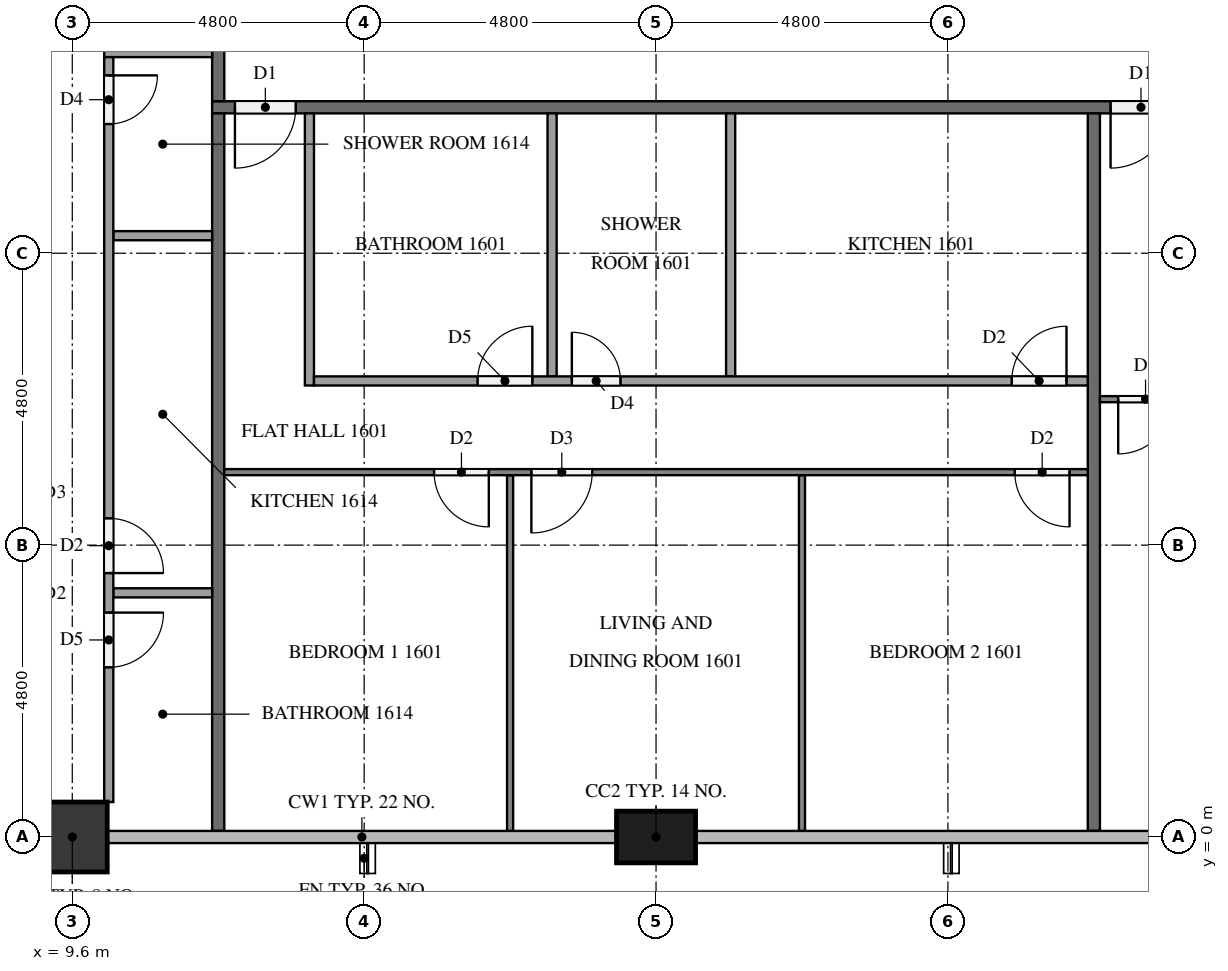
"""IFC4 building model, lengths in metres.
Left out: names, types, materials, properties, quantities, classifications, styles, units other than length and angle.
Written with IfcOpenShell. Run it as: python <this file> out.ifc"""

import sys

from ifc_helpers import new_model, si_unit, direction, frame, frame_2d, origin, origin_2d, place, context, subcontext, project, spatial, rectangle, extrude, element, fill, save


model = new_model("IFC4")
c1 = context("Model", 3, precision=1e-05, world=origin(), true_north=direction((0.0, 1.0)))
c2 = subcontext(c1, "Body", "Model", "MODEL_VIEW")
j1 = project(units=[si_unit("LENGTHUNIT", "METRE"), si_unit("PLANEANGLEUNIT", "RADIAN")], contexts=[c1])
p1 = place(None, origin())
s1 = spatial("IfcSite", under=j1, at=p1, CompositionType="ELEMENT")
p2 = place(p1, origin())
s2 = spatial("IfcBuilding", under=s1, at=p2, CompositionType="ELEMENT")
p3 = place(p2, frame((0.0, 0.0, 66.3)))
s3 = spatial("IfcBuildingStorey", under=s2, at=p3, CompositionType="ELEMENT", Elevation=66.3)
p4 = place(p3, frame((9.6, 0.0, 0.0), z_axis=(0.0, 0.0, 1.0), x_axis=(1.0, 0.0, 0.0)))
e1 = element("IfcColumn", 1, at=p4, inside=s3, PredefinedType="COLUMN", context=c2, shape_type="SweptSolid", body=[
    extrude(rectangle(XDim=1.15, YDim=1.15, at=origin_2d()), origin(), (0.0, 0.0, 1.0), 3.2),
])
p5 = place(p3, frame((19.2, 0.0, 0.0), z_axis=(0.0, 0.0, 1.0), x_axis=(1.0, 0.0, 0.0)))
e2 = element("IfcColumn", 2, at=p5, inside=s3, PredefinedType="COLUMN", context=c2, shape_type="SweptSolid", body=[
    extrude(rectangle(XDim=1.3, YDim=0.85, at=origin_2d()), origin(), (0.0, 0.0, 1.0), 3.2),
])
p6 = place(p3, frame((50.5, 12.0, 0.0), z_axis=(0.0, 0.0, 1.0), x_axis=(-1.0, 0.0, 0.0)))
e3 = element("IfcWall", 3, at=p6, inside=s3, PredefinedType="PARTITIONING", context=c2, shape_type="SweptSolid", body=[
    extrude(rectangle(XDim=38.6, YDim=0.2, at=frame_2d((19.3, 0.0))), origin(), (0.0, 0.0, 1.0), 3.2),
])
p7 = place(p6, frame((37.225, 0.0, 0.0)))
e4 = element("IfcOpeningElement", 4, at=p7, cuts=e3, PredefinedType="OPENING", context=c2, shape_type="SweptSolid", body=[
    extrude(rectangle(XDim=1.0, YDim=2.1, at=frame_2d((0.5, 1.05))), frame((0.0, 0.11, 0.0), z_axis=(0.0, -1.0, 0.0), x_axis=(1.0, 0.0, 0.0)), (0.0, 0.0, 1.0), 0.22),
])
p8 = place(p6, frame((22.825, 0.0, 0.0)))
e5 = element("IfcOpeningElement", 5, at=p8, cuts=e3, PredefinedType="OPENING", context=c2, shape_type="SweptSolid", body=[
    extrude(rectangle(XDim=1.0, YDim=2.1, at=frame_2d((0.5, 1.05))), frame((0.0, 0.11, 0.0), z_axis=(0.0, -1.0, 0.0), x_axis=(1.0, 0.0, 0.0)), (0.0, 0.0, 1.0), 0.22),
])
p9 = place(p6, frame((0.375, 0.0, 0.0)))
e6 = element("IfcOpeningElement", 6, at=p9, cuts=e3, PredefinedType="OPENING", context=c2, shape_type="SweptSolid", body=[
    extrude(rectangle(XDim=1.0, YDim=2.1, at=frame_2d((0.5, 1.05))), frame((0.0, 0.11, 0.0), z_axis=(0.0, -1.0, 0.0), x_axis=(1.0, 0.0, 0.0)), (0.0, 0.0, 1.0), 0.22),
])
p10 = place(p3, frame((12.0, 12.1, 0.0), z_axis=(0.0, 0.0, 1.0), x_axis=(0.0, 1.0, 0.0)))
e7 = element("IfcWall", 7, at=p10, inside=s3, PredefinedType="PARTITIONING", context=c2, shape_type="SweptSolid", body=[
    extrude(rectangle(XDim=28.6, YDim=0.2, at=frame_2d((14.3, 0.0))), origin(), (0.0, 0.0, 1.0), 3.2),
])
p11 = place(p10, frame((19.375, 0.0, 0.0)))
e8 = element("IfcOpeningElement", 8, at=p11, cuts=e7, PredefinedType="OPENING", context=c2, shape_type="SweptSolid", body=[
    extrude(rectangle(XDim=1.0, YDim=2.1, at=frame_2d((0.5, 1.05))), frame((0.0, 0.11, 0.0), z_axis=(0.0, -1.0, 0.0), x_axis=(1.0, 0.0, 0.0)), (0.0, 0.0, 1.0), 0.22),
])
p12 = place(p10, frame((12.175, 0.0, 0.0)))
e9 = element("IfcOpeningElement", 9, at=p12, cuts=e7, PredefinedType="OPENING", context=c2, shape_type="SweptSolid", body=[
    extrude(rectangle(XDim=1.0, YDim=2.1, at=frame_2d((0.5, 1.05))), frame((0.0, 0.11, 0.0), z_axis=(0.0, -1.0, 0.0), x_axis=(1.0, 0.0, 0.0)), (0.0, 0.0, 1.0), 0.22),
])
p13 = place(p10, frame((2.575, 0.0, 0.0)))
e10 = element("IfcOpeningElement", 10, at=p13, cuts=e7, PredefinedType="OPENING", context=c2, shape_type="SweptSolid", body=[
    extrude(rectangle(XDim=1.0, YDim=2.1, at=frame_2d((0.5, 1.05))), frame((0.0, 0.11, 0.0), z_axis=(0.0, -1.0, 0.0), x_axis=(1.0, 0.0, 0.0)), (0.0, 0.0, 1.0), 0.22),
])
p14 = place(p10, frame((1.025, 0.0, 0.0)))
e11 = element("IfcOpeningElement", 11, at=p14, cuts=e7, PredefinedType="OPENING", context=c2, shape_type="SweptSolid", body=[
    extrude(rectangle(XDim=1.0, YDim=2.1, at=frame_2d((0.5, 1.05))), frame((0.0, 0.11, 0.0), z_axis=(0.0, -1.0, 0.0), x_axis=(1.0, 0.0, 0.0)), (0.0, 0.0, 1.0), 0.22),
])
for number, where, z_axis, x_axis in (
    (12, (26.4, 11.9, 0.0), (0.0, 0.0, 1.0), (0.0, -1.0, 0.0)),
    (13, (12.0, 0.1, 0.0), (0.0, 0.0, 1.0), (0.0, 1.0, 0.0)),
):
    element("IfcWall", number, at=place(p3, frame(where, z_axis=z_axis, x_axis=x_axis)), inside=s3, PredefinedType="PARTITIONING", context=c2, shape_type="SweptSolid", body=[
        extrude(rectangle(XDim=11.8, YDim=0.2, at=frame_2d((5.9, 0.0))), origin(), (0.0, 0.0, 1.0), 3.2),
    ])
for number, where, z_axis, x_axis in (
    (14, (16.8, 5.95, 0.0), (0.0, 0.0, 1.0), (0.0, -1.0, 0.0)),
    (15, (21.6, 5.95, 0.0), (0.0, 0.0, 1.0), (0.0, -1.0, 0.0)),
):
    element("IfcWall", number, at=place(p3, frame(where, z_axis=z_axis, x_axis=x_axis)), inside=s3, PredefinedType="PARTITIONING", context=c2, shape_type="SweptSolid", body=[
        extrude(rectangle(XDim=5.85, YDim=0.1, at=frame_2d((2.925, 0.0))), origin(), (0.0, 0.0, 1.0), 3.2),
    ])
p15 = place(p3, frame((26.3, 6.0, 0.0), z_axis=(0.0, 0.0, 1.0), x_axis=(-1.0, 0.0, 0.0)))
e16 = element("IfcWall", 16, at=p15, inside=s3, PredefinedType="PARTITIONING", context=c2, shape_type="SweptSolid", body=[
    extrude(rectangle(XDim=14.2, YDim=0.1, at=frame_2d((7.1, 0.0))), origin(), (0.0, 0.0, 1.0), 3.2),
])
p16 = place(p15, frame((9.85, 0.0, 0.0)))
e17 = element("IfcOpeningElement", 17, at=p16, cuts=e16, PredefinedType="OPENING", context=c2, shape_type="SweptSolid", body=[
    extrude(rectangle(XDim=0.9, YDim=2.1, at=frame_2d((0.45, 1.05))), frame((0.0, 0.06, 0.0), z_axis=(0.0, -1.0, 0.0), x_axis=(1.0, 0.0, 0.0)), (0.0, 0.0, 1.0), 0.12),
])
p17 = place(p15, frame((8.15, 0.0, 0.0)))
e18 = element("IfcOpeningElement", 18, at=p17, cuts=e16, PredefinedType="OPENING", context=c2, shape_type="SweptSolid", body=[
    extrude(rectangle(XDim=1.0, YDim=2.1, at=frame_2d((0.5, 1.05))), frame((0.0, 0.06, 0.0), z_axis=(0.0, -1.0, 0.0), x_axis=(1.0, 0.0, 0.0)), (0.0, 0.0, 1.0), 0.12),
])
p18 = place(p15, frame((0.3, 0.0, 0.0)))
e19 = element("IfcOpeningElement", 19, at=p18, cuts=e16, PredefinedType="OPENING", context=c2, shape_type="SweptSolid", body=[
    extrude(rectangle(XDim=0.9, YDim=2.1, at=frame_2d((0.45, 1.05))), frame((0.0, 0.06, 0.0), z_axis=(0.0, -1.0, 0.0), x_axis=(1.0, 0.0, 0.0)), (0.0, 0.0, 1.0), 0.12),
])
for number, where, z_axis, x_axis in (
    (20, (17.49, 11.9, 0.0), (0.0, 0.0, 1.0), (0.0, -1.0, 0.0)),
    (21, (20.427, 11.9, 0.0), (0.0, 0.0, 1.0), (0.0, -1.0, 0.0)),
):
    element("IfcWall", number, at=place(p3, frame(where, z_axis=z_axis, x_axis=x_axis)), inside=s3, PredefinedType="PARTITIONING", context=c2, shape_type="SweptSolid", body=[
        extrude(rectangle(XDim=4.325, YDim=0.15, at=frame_2d((2.163, 0.0))), origin(), (0.0, 0.0, 1.0), 3.2),
    ])
p19 = place(p3, frame((13.5, 11.9, 0.0), z_axis=(0.0, 0.0, 1.0), x_axis=(0.0, -1.0, 0.0)))
e22 = element("IfcWall", 22, at=p19, inside=s3, PredefinedType="PARTITIONING", context=c2, shape_type="SweptSolid", body=[
    extrude(rectangle(XDim=4.475, YDim=0.15, at=frame_2d((2.237, 0.0))), origin(), (0.0, 0.0, 1.0), 3.2),
])
p20 = place(p3, frame((13.575, 7.5, 0.0), z_axis=(0.0, 0.0, 1.0), x_axis=(1.0, 0.0, 0.0)))
e23 = element("IfcWall", 23, at=p20, inside=s3, PredefinedType="PARTITIONING", context=c2, shape_type="SweptSolid", body=[
    extrude(rectangle(XDim=12.725, YDim=0.15, at=frame_2d((6.363, 0.0))), origin(), (0.0, 0.0, 1.0), 3.2),
])
p21 = place(p20, frame((2.69, 0.0, 0.0)))
e24 = element("IfcOpeningElement", 24, at=p21, cuts=e23, PredefinedType="OPENING", context=c2, shape_type="SweptSolid", body=[
    extrude(rectangle(XDim=0.9, YDim=2.1, at=frame_2d((0.45, 1.05))), frame((0.0, 0.085, 0.0), z_axis=(0.0, -1.0, 0.0), x_axis=(1.0, 0.0, 0.0)), (0.0, 0.0, 1.0), 0.17),
])
p22 = place(p20, frame((4.24, 0.0, 0.0)))
e25 = element("IfcOpeningElement", 25, at=p22, cuts=e23, PredefinedType="OPENING", context=c2, shape_type="SweptSolid", body=[
    extrude(rectangle(XDim=0.8, YDim=2.1, at=frame_2d((0.4, 1.05))), frame((0.0, 0.085, 0.0), z_axis=(0.0, -1.0, 0.0), x_axis=(1.0, 0.0, 0.0)), (0.0, 0.0, 1.0), 0.17),
])
p23 = place(p20, frame((11.475, 0.0, 0.0)))
e26 = element("IfcOpeningElement", 26, at=p23, cuts=e23, PredefinedType="OPENING", context=c2, shape_type="SweptSolid", body=[
    extrude(rectangle(XDim=0.9, YDim=2.1, at=frame_2d((0.45, 1.05))), frame((0.0, 0.085, 0.0), z_axis=(0.0, -1.0, 0.0), x_axis=(1.0, 0.0, 0.0)), (0.0, 0.0, 1.0), 0.17),
])
p24 = place(p3, frame((40.7, 7.2, 0.0), z_axis=(0.0, 0.0, 1.0), x_axis=(-1.0, 0.0, 0.0)))
e27 = element("IfcWall", 27, at=p24, inside=s3, PredefinedType="PARTITIONING", context=c2, shape_type="SweptSolid", body=[
    extrude(rectangle(XDim=14.2, YDim=0.1, at=frame_2d((7.1, 0.0))), origin(), (0.0, 0.0, 1.0), 3.2),
])
p25 = place(p24, frame((13.0, 0.0, 0.0)))
e28 = element("IfcOpeningElement", 28, at=p25, cuts=e27, PredefinedType="OPENING", context=c2, shape_type="SweptSolid", body=[
    extrude(rectangle(XDim=0.9, YDim=2.1, at=frame_2d((0.45, 1.05))), frame((0.0, 0.06, 0.0), z_axis=(0.0, -1.0, 0.0), x_axis=(1.0, 0.0, 0.0)), (0.0, 0.0, 1.0), 0.12),
])
p26 = place(p24, frame((5.05, 0.0, 0.0)))
e29 = element("IfcOpeningElement", 29, at=p26, cuts=e27, PredefinedType="OPENING", context=c2, shape_type="SweptSolid", body=[
    extrude(rectangle(XDim=1.0, YDim=2.1, at=frame_2d((0.5, 1.05))), frame((0.0, 0.06, 0.0), z_axis=(0.0, -1.0, 0.0), x_axis=(1.0, 0.0, 0.0)), (0.0, 0.0, 1.0), 0.12),
])
p27 = place(p24, frame((3.45, 0.0, 0.0)))
e30 = element("IfcOpeningElement", 30, at=p27, cuts=e27, PredefinedType="OPENING", context=c2, shape_type="SweptSolid", body=[
    extrude(rectangle(XDim=0.9, YDim=2.1, at=frame_2d((0.45, 1.05))), frame((0.0, 0.06, 0.0), z_axis=(0.0, -1.0, 0.0), x_axis=(1.0, 0.0, 0.0)), (0.0, 0.0, 1.0), 0.12),
])
for number, where, z_axis, x_axis in (
    (31, (11.9, 9.888, 0.0), (0.0, 0.0, 1.0), (-1.0, 0.0, 0.0)),
    (32, (11.9, 4.015, 0.0), (0.0, 0.0, 1.0), (-1.0, 0.0, 0.0)),
):
    element("IfcWall", number, at=place(p3, frame(where, z_axis=z_axis, x_axis=x_axis)), inside=s3, PredefinedType="PARTITIONING", context=c2, shape_type="SweptSolid", body=[
        extrude(rectangle(XDim=1.625, YDim=0.15, at=frame_2d((0.812, 0.0))), origin(), (0.0, 0.0, 1.0), 3.2),
    ])
p28 = place(p3, frame((11.9, 12.9, 0.0), z_axis=(0.0, 0.0, 1.0), x_axis=(-1.0, 0.0, 0.0)))
e33 = element("IfcWall", 33, at=p28, inside=s3, PredefinedType="PARTITIONING", context=c2, shape_type="SweptSolid", body=[
    extrude(rectangle(XDim=1.775, YDim=0.15, at=frame_2d((0.887, 0.0))), origin(), (0.0, 0.0, 1.0), 3.2),
])
p29 = place(p3, frame((10.2, 12.825, 0.0), z_axis=(0.0, 0.0, 1.0), x_axis=(0.0, -1.0, 0.0)))
e34 = element("IfcWall", 34, at=p29, inside=s3, PredefinedType="PARTITIONING", context=c2, shape_type="SweptSolid", body=[
    extrude(rectangle(XDim=12.25, YDim=0.15, at=frame_2d((6.125, 0.0))), origin(), (0.0, 0.0, 1.0), 3.2),
])
p30 = place(p29, frame((0.3, 0.0, 0.0)))
e35 = element("IfcOpeningElement", 35, at=p30, cuts=e34, PredefinedType="OPENING", context=c2, shape_type="SweptSolid", body=[
    extrude(rectangle(XDim=0.8, YDim=2.1, at=frame_2d((0.4, 1.05))), frame((0.0, 0.085, 0.0), z_axis=(0.0, -1.0, 0.0), x_axis=(1.0, 0.0, 0.0)), (0.0, 0.0, 1.0), 0.17),
])
p31 = place(p29, frame((7.585, 0.0, 0.0)))
e36 = element("IfcOpeningElement", 36, at=p31, cuts=e34, PredefinedType="OPENING", context=c2, shape_type="SweptSolid", body=[
    extrude(rectangle(XDim=0.9, YDim=2.1, at=frame_2d((0.45, 1.05))), frame((0.0, 0.085, 0.0), z_axis=(0.0, -1.0, 0.0), x_axis=(1.0, 0.0, 0.0)), (0.0, 0.0, 1.0), 0.17),
])
p32 = place(p29, frame((9.135, 0.0, 0.0)))
e37 = element("IfcOpeningElement", 37, at=p32, cuts=e34, PredefinedType="OPENING", context=c2, shape_type="SweptSolid", body=[
    extrude(rectangle(XDim=0.9, YDim=2.1, at=frame_2d((0.45, 1.05))), frame((0.0, 0.085, 0.0), z_axis=(0.0, -1.0, 0.0), x_axis=(1.0, 0.0, 0.0)), (0.0, 0.0, 1.0), 0.17),
])
p33 = place(p7, origin())
e38 = element("IfcDoor", 38, at=p33, inside=s3, OperationType="SINGLE_SWING_RIGHT", PredefinedType="DOOR", context=c2, shape_type="SweptSolid", body=[
    extrude(rectangle(XDim=1.0, YDim=2.1, at=frame_2d((0.5, 1.05))), frame((0.0, 0.025, 0.0), z_axis=(0.0, -1.0, 0.0), x_axis=(1.0, 0.0, 0.0)), (0.0, 0.0, 1.0), 0.05),
])
fill(e4, e38)
p34 = place(p8, origin())
e39 = element("IfcDoor", 39, at=p34, inside=s3, OperationType="SINGLE_SWING_RIGHT", PredefinedType="DOOR", context=c2, shape_type="SweptSolid", body=[
    extrude(rectangle(XDim=1.0, YDim=2.1, at=frame_2d((0.5, 1.05))), frame((0.0, 0.025, 0.0), z_axis=(0.0, -1.0, 0.0), x_axis=(1.0, 0.0, 0.0)), (0.0, 0.0, 1.0), 0.05),
])
fill(e5, e39)
p35 = place(p16, origin())
e40 = element("IfcDoor", 40, at=p35, inside=s3, OperationType="SINGLE_SWING_LEFT", PredefinedType="DOOR", context=c2, shape_type="SweptSolid", body=[
    extrude(rectangle(XDim=0.9, YDim=2.1, at=frame_2d((0.45, 1.05))), frame((0.0, 0.025, 0.0), z_axis=(0.0, -1.0, 0.0), x_axis=(1.0, 0.0, 0.0)), (0.0, 0.0, 1.0), 0.05),
])
fill(e17, e40)
p36 = place(p17, origin())
e41 = element("IfcDoor", 41, at=p36, inside=s3, OperationType="SINGLE_SWING_RIGHT", PredefinedType="DOOR", context=c2, shape_type="SweptSolid", body=[
    extrude(rectangle(XDim=1.0, YDim=2.1, at=frame_2d((0.5, 1.05))), frame((0.0, 0.025, 0.0), z_axis=(0.0, -1.0, 0.0), x_axis=(1.0, 0.0, 0.0)), (0.0, 0.0, 1.0), 0.05),
])
fill(e18, e41)
p37 = place(p18, origin())
e42 = element("IfcDoor", 42, at=p37, inside=s3, OperationType="SINGLE_SWING_LEFT", PredefinedType="DOOR", context=c2, shape_type="SweptSolid", body=[
    extrude(rectangle(XDim=0.9, YDim=2.1, at=frame_2d((0.45, 1.05))), frame((0.0, 0.025, 0.0), z_axis=(0.0, -1.0, 0.0), x_axis=(1.0, 0.0, 0.0)), (0.0, 0.0, 1.0), 0.05),
])
fill(e19, e42)
p38 = place(p21, origin())
e43 = element("IfcDoor", 43, at=p38, inside=s3, OperationType="SINGLE_SWING_RIGHT", PredefinedType="DOOR", context=c2, shape_type="SweptSolid", body=[
    extrude(rectangle(XDim=0.9, YDim=2.1, at=frame_2d((0.45, 1.05))), frame((0.0, 0.025, 0.0), z_axis=(0.0, -1.0, 0.0), x_axis=(1.0, 0.0, 0.0)), (0.0, 0.0, 1.0), 0.05),
])
fill(e24, e43)
p39 = place(p22, origin())
e44 = element("IfcDoor", 44, at=p39, inside=s3, OperationType="SINGLE_SWING_LEFT", PredefinedType="DOOR", context=c2, shape_type="SweptSolid", body=[
    extrude(rectangle(XDim=0.8, YDim=2.1, at=frame_2d((0.4, 1.05))), frame((0.0, 0.025, 0.0), z_axis=(0.0, -1.0, 0.0), x_axis=(1.0, 0.0, 0.0)), (0.0, 0.0, 1.0), 0.05),
])
fill(e25, e44)
p40 = place(p23, origin())
e45 = element("IfcDoor", 45, at=p40, inside=s3, OperationType="SINGLE_SWING_RIGHT", PredefinedType="DOOR", context=c2, shape_type="SweptSolid", body=[
    extrude(rectangle(XDim=0.9, YDim=2.1, at=frame_2d((0.45, 1.05))), frame((0.0, 0.025, 0.0), z_axis=(0.0, -1.0, 0.0), x_axis=(1.0, 0.0, 0.0)), (0.0, 0.0, 1.0), 0.05),
])
fill(e26, e45)
p41 = place(p25, origin())
e46 = element("IfcDoor", 46, at=p41, inside=s3, OperationType="SINGLE_SWING_RIGHT", PredefinedType="DOOR", context=c2, shape_type="SweptSolid", body=[
    extrude(rectangle(XDim=0.9, YDim=2.1, at=frame_2d((0.45, 1.05))), frame((0.0, 0.025, 0.0), z_axis=(0.0, -1.0, 0.0), x_axis=(1.0, 0.0, 0.0)), (0.0, 0.0, 1.0), 0.05),
])
fill(e28, e46)
p42 = place(p30, origin())
e47 = element("IfcDoor", 47, at=p42, inside=s3, OperationType="SINGLE_SWING_LEFT", PredefinedType="DOOR", context=c2, shape_type="SweptSolid", body=[
    extrude(rectangle(XDim=0.8, YDim=2.1, at=frame_2d((0.4, 1.05))), frame((0.0, 0.025, 0.0), z_axis=(0.0, -1.0, 0.0), x_axis=(1.0, 0.0, 0.0)), (0.0, 0.0, 1.0), 0.05),
])
fill(e35, e47)
p43 = place(p31, origin())
e48 = element("IfcDoor", 48, at=p43, inside=s3, OperationType="SINGLE_SWING_RIGHT", PredefinedType="DOOR", context=c2, shape_type="SweptSolid", body=[
    extrude(rectangle(XDim=0.9, YDim=2.1, at=frame_2d((0.45, 1.05))), frame((0.0, 0.025, 0.0), z_axis=(0.0, -1.0, 0.0), x_axis=(1.0, 0.0, 0.0)), (0.0, 0.0, 1.0), 0.05),
])
fill(e36, e48)
p44 = place(p32, origin())
e49 = element("IfcDoor", 49, at=p44, inside=s3, OperationType="SINGLE_SWING_LEFT", PredefinedType="DOOR", context=c2, shape_type="SweptSolid", body=[
    extrude(rectangle(XDim=0.9, YDim=2.1, at=frame_2d((0.45, 1.05))), frame((0.0, 0.025, 0.0), z_axis=(0.0, -1.0, 0.0), x_axis=(1.0, 0.0, 0.0)), (0.0, 0.0, 1.0), 0.05),
])
fill(e37, e49)
save(model, sys.argv[1])
